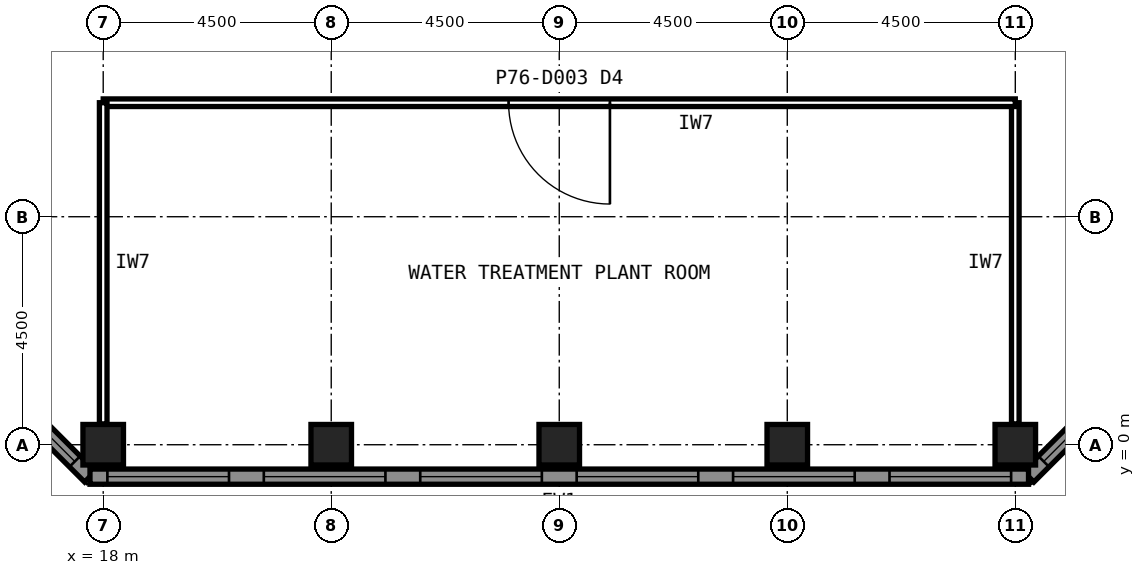
"""IFC4 building model, lengths in metres.
Left out: names, types, materials, properties, quantities, classifications, styles, units other than length and angle.
Written with IfcOpenShell. Run it as: python <this file> out.ifc"""

import sys

from ifc_helpers import new_model, si_unit, direction, frame, frame_2d, origin, origin_2d, place, context, subcontext, project, spatial, polyline, rectangle, hollow_rectangle, outline, extrude, element, fill, save


model = new_model("IFC4")
c1 = context("Model", 3, precision=1e-05, world=origin(), true_north=direction((0.0, 1.0)))
c2 = subcontext(c1, "Body", "Model", "MODEL_VIEW")
j1 = project(units=[si_unit("LENGTHUNIT", "METRE"), si_unit("PLANEANGLEUNIT", "RADIAN")], contexts=[c1])
p1 = place(None, origin())
s1 = spatial("IfcSite", under=j1, at=p1, CompositionType="ELEMENT")
p2 = place(p1, origin())
s2 = spatial("IfcBuilding", under=s1, at=p2, CompositionType="ELEMENT")
p3 = place(p2, frame((0.0, 0.0, 320.1)))
s3 = spatial("IfcBuildingStorey", under=s2, at=p3, CompositionType="ELEMENT", Elevation=320.1)
for number, where, z_axis, x_axis in (
    (1, (18.0, 0.0, 0.0), (0.0, 0.0, 1.0), (1.0, 0.0, 0.0)),
    (2, (22.5, 0.0, 0.0), (0.0, 0.0, 1.0), (1.0, 0.0, 0.0)),
    (3, (27.0, 0.0, 0.0), (0.0, 0.0, 1.0), (1.0, 0.0, 0.0)),
    (4, (31.5, 0.0, 0.0), (0.0, 0.0, 1.0), (1.0, 0.0, 0.0)),
    (5, (36.0, 0.0, 0.0), (0.0, 0.0, 1.0), (1.0, 0.0, 0.0)),
):
    element("IfcColumn", number, at=place(p3, frame(where, z_axis=z_axis, x_axis=x_axis)), inside=s3, PredefinedType="COLUMN", context=c2, shape_type="SweptSolid", body=[
        extrude(hollow_rectangle(XDim=0.8, YDim=0.8, WallThickness=0.045, at=origin_2d()), origin(), (0.0, 0.0, 1.0), 5.307),
    ])
p4 = place(p3, frame((17.739, -0.63, 0.0), z_axis=(0.0, 0.0, 1.0), x_axis=(-0.707106781187, 0.707106781187, 0.0)))
e6 = element("IfcWall", 6, at=p4, inside=s3, PredefinedType="SOLIDWALL", context=c2, shape_type="SweptSolid", body=[
    extrude(outline(polyline([(0.0, 0.0), (25.978, 0.0), (25.978, 12.722), (0.0, 7.211), (0.0, 0.0)])), frame((0.0, 0.15, 0.0), z_axis=(0.0, -1.0, 0.0), x_axis=(1.0, 0.0, 0.0)), (0.0, 0.0, 1.0), 0.3),
])
p5 = place(p4, frame((0.424, 0.0, 1.2)))
e7 = element("IfcOpeningElement", 7, at=p5, cuts=e6, PredefinedType="OPENING", context=c2, shape_type="SweptSolid", body=[
    extrude(rectangle(XDim=2.4, YDim=2.4, at=frame_2d((1.2, 1.2))), frame((0.0, 0.16, 0.0), z_axis=(0.0, -1.0, 0.0), x_axis=(1.0, 0.0, 0.0)), (0.0, 0.0, 1.0), 0.32),
])
p6 = place(p4, frame((3.671, 0.0, 1.2)))
e8 = element("IfcOpeningElement", 8, at=p6, cuts=e6, PredefinedType="OPENING", context=c2, shape_type="SweptSolid", body=[
    extrude(rectangle(XDim=2.4, YDim=2.4, at=frame_2d((1.2, 1.2))), frame((0.0, 0.16, 0.0), z_axis=(0.0, -1.0, 0.0), x_axis=(1.0, 0.0, 0.0)), (0.0, 0.0, 1.0), 0.32),
])
p7 = place(p4, frame((6.918, 0.0, 1.2)))
e9 = element("IfcOpeningElement", 9, at=p7, cuts=e6, PredefinedType="OPENING", context=c2, shape_type="SweptSolid", body=[
    extrude(rectangle(XDim=2.4, YDim=2.4, at=frame_2d((1.2, 1.2))), frame((0.0, 0.16, 0.0), z_axis=(0.0, -1.0, 0.0), x_axis=(1.0, 0.0, 0.0)), (0.0, 0.0, 1.0), 0.32),
])
p8 = place(p4, frame((10.165, 0.0, 1.2)))
e10 = element("IfcOpeningElement", 10, at=p8, cuts=e6, PredefinedType="OPENING", context=c2, shape_type="SweptSolid", body=[
    extrude(rectangle(XDim=2.4, YDim=2.4, at=frame_2d((1.2, 1.2))), frame((0.0, 0.16, 0.0), z_axis=(0.0, -1.0, 0.0), x_axis=(1.0, 0.0, 0.0)), (0.0, 0.0, 1.0), 0.32),
])
p9 = place(p4, frame((13.412, 0.0, 5.25)))
e11 = element("IfcOpeningElement", 11, at=p9, cuts=e6, PredefinedType="OPENING", context=c2, shape_type="SweptSolid", body=[
    extrude(rectangle(XDim=2.4, YDim=2.4, at=frame_2d((1.2, 1.2))), frame((0.0, 0.16, 0.0), z_axis=(0.0, -1.0, 0.0), x_axis=(1.0, 0.0, 0.0)), (0.0, 0.0, 1.0), 0.32),
])
p10 = place(p4, frame((16.66, 0.0, 5.35)))
e12 = element("IfcOpeningElement", 12, at=p10, cuts=e6, PredefinedType="OPENING", context=c2, shape_type="SweptSolid", body=[
    extrude(rectangle(XDim=2.4, YDim=2.4, at=frame_2d((1.2, 1.2))), frame((0.0, 0.16, 0.0), z_axis=(0.0, -1.0, 0.0), x_axis=(1.0, 0.0, 0.0)), (0.0, 0.0, 1.0), 0.32),
])
p11 = place(p4, frame((19.907, 0.0, 1.2)))
e13 = element("IfcOpeningElement", 13, at=p11, cuts=e6, PredefinedType="OPENING", context=c2, shape_type="SweptSolid", body=[
    extrude(rectangle(XDim=2.4, YDim=2.4, at=frame_2d((1.2, 1.2))), frame((0.0, 0.16, 0.0), z_axis=(0.0, -1.0, 0.0), x_axis=(1.0, 0.0, 0.0)), (0.0, 0.0, 1.0), 0.32),
])
p12 = place(p4, frame((23.154, 0.0, 1.2)))
e14 = element("IfcOpeningElement", 14, at=p12, cuts=e6, PredefinedType="OPENING", context=c2, shape_type="SweptSolid", body=[
    extrude(rectangle(XDim=2.4, YDim=2.4, at=frame_2d((1.2, 1.2))), frame((0.0, 0.16, 0.0), z_axis=(0.0, -1.0, 0.0), x_axis=(1.0, 0.0, 0.0)), (0.0, 0.0, 1.0), 0.32),
])
p13 = place(p3, frame((54.63, 17.739, 0.0), z_axis=(0.0, 0.0, 1.0), x_axis=(-0.707106781187, -0.707106781187, 0.0)))
e15 = element("IfcWall", 15, at=p13, inside=s3, PredefinedType="SOLIDWALL", context=c2, shape_type="SweptSolid", body=[
    extrude(outline(polyline([(0.0, 0.0), (25.978, 0.0), (25.978, 7.211), (0.0, 12.722), (0.0, 0.0)])), frame((0.0, 0.15, 0.0), z_axis=(0.0, -1.0, 0.0), x_axis=(1.0, 0.0, 0.0)), (0.0, 0.0, 1.0), 0.3),
])
p14 = place(p13, frame((0.424, 0.0, 1.2)))
e16 = element("IfcOpeningElement", 16, at=p14, cuts=e15, PredefinedType="OPENING", context=c2, shape_type="SweptSolid", body=[
    extrude(rectangle(XDim=2.4, YDim=2.4, at=frame_2d((1.2, 1.2))), frame((0.0, 0.16, 0.0), z_axis=(0.0, -1.0, 0.0), x_axis=(1.0, 0.0, 0.0)), (0.0, 0.0, 1.0), 0.32),
])
p15 = place(p13, frame((3.671, 0.0, 1.2)))
e17 = element("IfcOpeningElement", 17, at=p15, cuts=e15, PredefinedType="OPENING", context=c2, shape_type="SweptSolid", body=[
    extrude(rectangle(XDim=2.4, YDim=2.4, at=frame_2d((1.2, 1.2))), frame((0.0, 0.16, 0.0), z_axis=(0.0, -1.0, 0.0), x_axis=(1.0, 0.0, 0.0)), (0.0, 0.0, 1.0), 0.32),
])
p16 = place(p13, frame((6.918, 0.0, 5.35)))
e18 = element("IfcOpeningElement", 18, at=p16, cuts=e15, PredefinedType="OPENING", context=c2, shape_type="SweptSolid", body=[
    extrude(rectangle(XDim=2.4, YDim=2.4, at=frame_2d((1.2, 1.2))), frame((0.0, 0.16, 0.0), z_axis=(0.0, -1.0, 0.0), x_axis=(1.0, 0.0, 0.0)), (0.0, 0.0, 1.0), 0.32),
])
p17 = place(p13, frame((10.165, 0.0, 5.25)))
e19 = element("IfcOpeningElement", 19, at=p17, cuts=e15, PredefinedType="OPENING", context=c2, shape_type="SweptSolid", body=[
    extrude(rectangle(XDim=2.4, YDim=2.4, at=frame_2d((1.2, 1.2))), frame((0.0, 0.16, 0.0), z_axis=(0.0, -1.0, 0.0), x_axis=(1.0, 0.0, 0.0)), (0.0, 0.0, 1.0), 0.32),
])
p18 = place(p13, frame((13.412, 0.0, 1.2)))
e20 = element("IfcOpeningElement", 20, at=p18, cuts=e15, PredefinedType="OPENING", context=c2, shape_type="SweptSolid", body=[
    extrude(rectangle(XDim=2.4, YDim=2.4, at=frame_2d((1.2, 1.2))), frame((0.0, 0.16, 0.0), z_axis=(0.0, -1.0, 0.0), x_axis=(1.0, 0.0, 0.0)), (0.0, 0.0, 1.0), 0.32),
])
p19 = place(p13, frame((16.66, 0.0, 1.2)))
e21 = element("IfcOpeningElement", 21, at=p19, cuts=e15, PredefinedType="OPENING", context=c2, shape_type="SweptSolid", body=[
    extrude(rectangle(XDim=2.4, YDim=2.4, at=frame_2d((1.2, 1.2))), frame((0.0, 0.16, 0.0), z_axis=(0.0, -1.0, 0.0), x_axis=(1.0, 0.0, 0.0)), (0.0, 0.0, 1.0), 0.32),
])
p20 = place(p13, frame((19.907, 0.0, 1.2)))
e22 = element("IfcOpeningElement", 22, at=p20, cuts=e15, PredefinedType="OPENING", context=c2, shape_type="SweptSolid", body=[
    extrude(rectangle(XDim=2.4, YDim=2.4, at=frame_2d((1.2, 1.2))), frame((0.0, 0.16, 0.0), z_axis=(0.0, -1.0, 0.0), x_axis=(1.0, 0.0, 0.0)), (0.0, 0.0, 1.0), 0.32),
])
p21 = place(p13, frame((23.154, 0.0, 1.2)))
e23 = element("IfcOpeningElement", 23, at=p21, cuts=e15, PredefinedType="OPENING", context=c2, shape_type="SweptSolid", body=[
    extrude(rectangle(XDim=2.4, YDim=2.4, at=frame_2d((1.2, 1.2))), frame((0.0, 0.16, 0.0), z_axis=(0.0, -1.0, 0.0), x_axis=(1.0, 0.0, 0.0)), (0.0, 0.0, 1.0), 0.32),
])
p22 = place(p3, frame((36.261, -0.63, 0.0), z_axis=(0.0, 0.0, 1.0), x_axis=(-1.0, 0.0, 0.0)))
e24 = element("IfcWall", 24, at=p22, inside=s3, PredefinedType="SOLIDWALL", context=c2, shape_type="SweptSolid", body=[
    extrude(rectangle(XDim=18.522, YDim=0.3, at=frame_2d((9.261, 0.0))), origin(), (0.0, 0.0, 1.0), 7.211),
])
p23 = place(p22, frame((0.344, 0.0, 1.2)))
e25 = element("IfcOpeningElement", 25, at=p23, cuts=e24, PredefinedType="OPENING", context=c2, shape_type="SweptSolid", body=[
    extrude(rectangle(XDim=2.4, YDim=2.4, at=frame_2d((1.2, 1.2))), frame((0.0, 0.16, 0.0), z_axis=(0.0, -1.0, 0.0), x_axis=(1.0, 0.0, 0.0)), (0.0, 0.0, 1.0), 0.32),
])
p24 = place(p22, frame((3.43, 0.0, 1.2)))
e26 = element("IfcOpeningElement", 26, at=p24, cuts=e24, PredefinedType="OPENING", context=c2, shape_type="SweptSolid", body=[
    extrude(rectangle(XDim=2.4, YDim=2.4, at=frame_2d((1.2, 1.2))), frame((0.0, 0.16, 0.0), z_axis=(0.0, -1.0, 0.0), x_axis=(1.0, 0.0, 0.0)), (0.0, 0.0, 1.0), 0.32),
])
p25 = place(p22, frame((6.518, 0.0, 1.2)))
e27 = element("IfcOpeningElement", 27, at=p25, cuts=e24, PredefinedType="OPENING", context=c2, shape_type="SweptSolid", body=[
    extrude(rectangle(XDim=2.4, YDim=2.4, at=frame_2d((1.2, 1.2))), frame((0.0, 0.16, 0.0), z_axis=(0.0, -1.0, 0.0), x_axis=(1.0, 0.0, 0.0)), (0.0, 0.0, 1.0), 0.32),
])
p26 = place(p22, frame((9.604, 0.0, 1.2)))
e28 = element("IfcOpeningElement", 28, at=p26, cuts=e24, PredefinedType="OPENING", context=c2, shape_type="SweptSolid", body=[
    extrude(rectangle(XDim=2.4, YDim=2.4, at=frame_2d((1.2, 1.2))), frame((0.0, 0.16, 0.0), z_axis=(0.0, -1.0, 0.0), x_axis=(1.0, 0.0, 0.0)), (0.0, 0.0, 1.0), 0.32),
])
p27 = place(p22, frame((12.691, 0.0, 1.2)))
e29 = element("IfcOpeningElement", 29, at=p27, cuts=e24, PredefinedType="OPENING", context=c2, shape_type="SweptSolid", body=[
    extrude(rectangle(XDim=2.4, YDim=2.4, at=frame_2d((1.2, 1.2))), frame((0.0, 0.16, 0.0), z_axis=(0.0, -1.0, 0.0), x_axis=(1.0, 0.0, 0.0)), (0.0, 0.0, 1.0), 0.32),
])
p28 = place(p22, frame((15.779, 0.0, 1.2)))
e30 = element("IfcOpeningElement", 30, at=p28, cuts=e24, PredefinedType="OPENING", context=c2, shape_type="SweptSolid", body=[
    extrude(rectangle(XDim=2.4, YDim=2.4, at=frame_2d((1.2, 1.2))), frame((0.0, 0.16, 0.0), z_axis=(0.0, -1.0, 0.0), x_axis=(1.0, 0.0, 0.0)), (0.0, 0.0, 1.0), 0.32),
])
p29 = place(p3, frame((36.0, 0.41, 0.0), z_axis=(0.0, 0.0, 1.0), x_axis=(0.0, 1.0, 0.0)))
e31 = element("IfcWall", 31, at=p29, inside=s3, PredefinedType="PARTITIONING", context=c2, shape_type="SweptSolid", body=[
    extrude(rectangle(XDim=6.34, YDim=0.15, at=frame_2d((3.17, 0.0))), origin(), (0.0, 0.0, 1.0), 4.246),
])
p30 = place(p3, frame((36.0, 6.75, 0.0), z_axis=(0.0, 0.0, 1.0), x_axis=(-1.0, 0.0, 0.0)))
e32 = element("IfcWall", 32, at=p30, inside=s3, PredefinedType="PARTITIONING", context=c2, shape_type="SweptSolid", body=[
    extrude(rectangle(XDim=18.0, YDim=0.15, at=frame_2d((9.0, 0.0))), origin(), (0.0, 0.0, 1.0), 4.246),
])
p31 = place(p30, frame((8.0, 0.0, 0.0)))
e33 = element("IfcOpeningElement", 33, at=p31, cuts=e32, PredefinedType="OPENING", context=c2, shape_type="SweptSolid", body=[
    extrude(rectangle(XDim=2.0, YDim=2.4, at=frame_2d((1.0, 1.2))), frame((0.0, 0.085, 0.0), z_axis=(0.0, -1.0, 0.0), x_axis=(1.0, 0.0, 0.0)), (0.0, 0.0, 1.0), 0.17),
])
p32 = place(p3, frame((18.0, 6.75, 0.0), z_axis=(0.0, 0.0, 1.0), x_axis=(0.0, -1.0, 0.0)))
e34 = element("IfcWall", 34, at=p32, inside=s3, PredefinedType="PARTITIONING", context=c2, shape_type="SweptSolid", body=[
    extrude(rectangle(XDim=6.34, YDim=0.15, at=frame_2d((3.17, 0.0))), origin(), (0.0, 0.0, 1.0), 4.246),
])
p33 = place(p5, origin())
e35 = element("IfcWindow", 35, at=p33, inside=s3, PartitioningType="SINGLE_PANEL", PredefinedType="USERDEFINED", context=c2, shape_type="SweptSolid", body=[
    extrude(rectangle(XDim=2.4, YDim=2.4, at=frame_2d((1.2, 1.2))), frame((0.0, 0.03, 0.0), z_axis=(0.0, -1.0, 0.0), x_axis=(1.0, 0.0, 0.0)), (0.0, 0.0, 1.0), 0.06),
])
fill(e7, e35)
p34 = place(p21, origin())
e36 = element("IfcWindow", 36, at=p34, inside=s3, PartitioningType="SINGLE_PANEL", PredefinedType="USERDEFINED", context=c2, shape_type="SweptSolid", body=[
    extrude(rectangle(XDim=2.4, YDim=2.4, at=frame_2d((1.2, 1.2))), frame((0.0, 0.03, 0.0), z_axis=(0.0, -1.0, 0.0), x_axis=(1.0, 0.0, 0.0)), (0.0, 0.0, 1.0), 0.06),
])
fill(e23, e36)
p35 = place(p23, origin())
e37 = element("IfcWindow", 37, at=p35, inside=s3, PartitioningType="SINGLE_PANEL", PredefinedType="USERDEFINED", context=c2, shape_type="SweptSolid", body=[
    extrude(rectangle(XDim=2.4, YDim=2.4, at=frame_2d((1.2, 1.2))), frame((0.0, 0.03, 0.0), z_axis=(0.0, -1.0, 0.0), x_axis=(1.0, 0.0, 0.0)), (0.0, 0.0, 1.0), 0.06),
])
fill(e25, e37)
p36 = place(p24, origin())
e38 = element("IfcWindow", 38, at=p36, inside=s3, PartitioningType="SINGLE_PANEL", PredefinedType="USERDEFINED", context=c2, shape_type="SweptSolid", body=[
    extrude(rectangle(XDim=2.4, YDim=2.4, at=frame_2d((1.2, 1.2))), frame((0.0, 0.03, 0.0), z_axis=(0.0, -1.0, 0.0), x_axis=(1.0, 0.0, 0.0)), (0.0, 0.0, 1.0), 0.06),
])
fill(e26, e38)
p37 = place(p25, origin())
e39 = element("IfcWindow", 39, at=p37, inside=s3, PartitioningType="SINGLE_PANEL", PredefinedType="USERDEFINED", context=c2, shape_type="SweptSolid", body=[
    extrude(rectangle(XDim=2.4, YDim=2.4, at=frame_2d((1.2, 1.2))), frame((0.0, 0.03, 0.0), z_axis=(0.0, -1.0, 0.0), x_axis=(1.0, 0.0, 0.0)), (0.0, 0.0, 1.0), 0.06),
])
fill(e27, e39)
p38 = place(p26, origin())
e40 = element("IfcWindow", 40, at=p38, inside=s3, PartitioningType="SINGLE_PANEL", PredefinedType="USERDEFINED", context=c2, shape_type="SweptSolid", body=[
    extrude(rectangle(XDim=2.4, YDim=2.4, at=frame_2d((1.2, 1.2))), frame((0.0, 0.03, 0.0), z_axis=(0.0, -1.0, 0.0), x_axis=(1.0, 0.0, 0.0)), (0.0, 0.0, 1.0), 0.06),
])
fill(e28, e40)
p39 = place(p27, origin())
e41 = element("IfcWindow", 41, at=p39, inside=s3, PartitioningType="SINGLE_PANEL", PredefinedType="USERDEFINED", context=c2, shape_type="SweptSolid", body=[
    extrude(rectangle(XDim=2.4, YDim=2.4, at=frame_2d((1.2, 1.2))), frame((0.0, 0.03, 0.0), z_axis=(0.0, -1.0, 0.0), x_axis=(1.0, 0.0, 0.0)), (0.0, 0.0, 1.0), 0.06),
])
fill(e29, e41)
p40 = place(p28, origin())
e42 = element("IfcWindow", 42, at=p40, inside=s3, PartitioningType="SINGLE_PANEL", PredefinedType="USERDEFINED", context=c2, shape_type="SweptSolid", body=[
    extrude(rectangle(XDim=2.4, YDim=2.4, at=frame_2d((1.2, 1.2))), frame((0.0, 0.03, 0.0), z_axis=(0.0, -1.0, 0.0), x_axis=(1.0, 0.0, 0.0)), (0.0, 0.0, 1.0), 0.06),
])
fill(e30, e42)
p41 = place(p31, origin())
e43 = element("IfcDoor", 43, at=p41, inside=s3, OperationType="SINGLE_SWING_LEFT", PredefinedType="DOOR", context=c2, shape_type="SweptSolid", body=[
    extrude(rectangle(XDim=2.0, YDim=2.4, at=frame_2d((1.0, 1.2))), frame((0.0, 0.025, 0.0), z_axis=(0.0, -1.0, 0.0), x_axis=(1.0, 0.0, 0.0)), (0.0, 0.0, 1.0), 0.05),
])
fill(e33, e43)
save(model, sys.argv[1])
